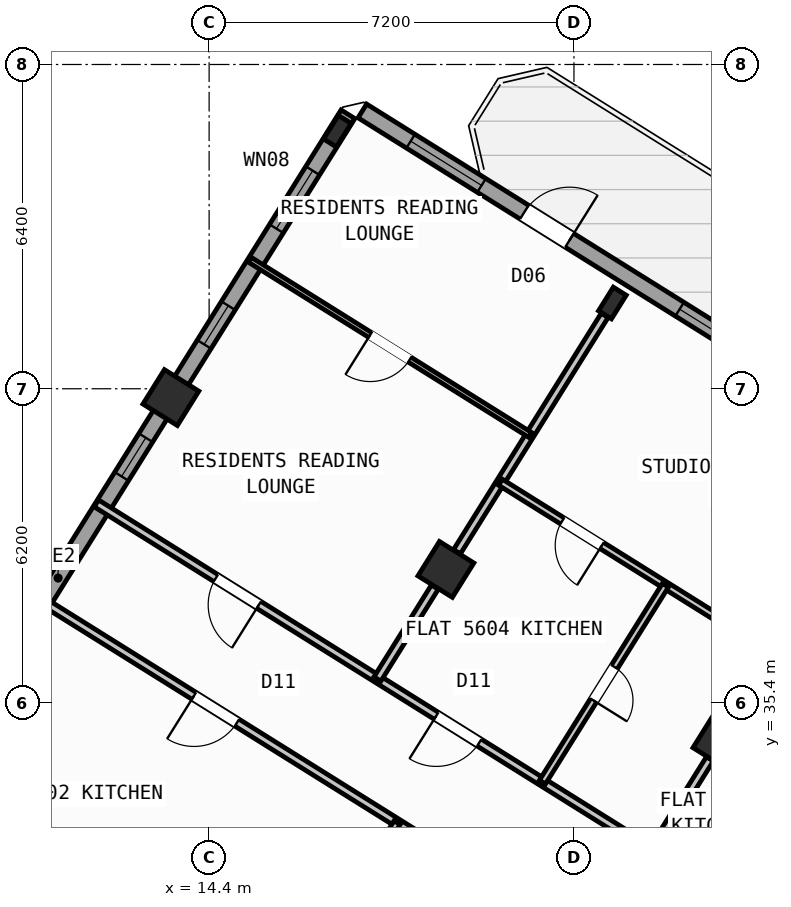
"""IFC4 building model, lengths in metres.
Left out: names, types, materials, properties, quantities, classifications, styles, units other than length and angle.
Written with IfcOpenShell. Run it as: python <this file> out.ifc"""

import sys

from ifc_helpers import new_model, si_unit, direction, frame, frame_2d, origin, origin_2d, place, context, subcontext, project, spatial, rectangle, hollow_rectangle, i_section, extrude, source, transform, mapped, element, fill, save


model = new_model("IFC4")
c1 = context("Model", 3, precision=1e-05, world=origin(), true_north=direction((0.0, 1.0)))
c2 = subcontext(c1, "Body", "Model", "MODEL_VIEW")
j1 = project(units=[si_unit("LENGTHUNIT", "METRE"), si_unit("PLANEANGLEUNIT", "RADIAN")], contexts=[c1])
p1 = place(None, origin())
s1 = spatial("IfcSite", under=j1, at=p1, CompositionType="ELEMENT")
p2 = place(p1, origin())
s2 = spatial("IfcBuilding", under=s1, at=p2, CompositionType="ELEMENT")
p3 = place(p2, frame((0.0, 0.0, 222.0)))
s3 = spatial("IfcBuildingStorey", under=s2, at=p3, CompositionType="ELEMENT", Elevation=222.0)
m1 = source(origin(), c2, "Body", "SweptSolid", [
    extrude(hollow_rectangle(XDim=0.8, YDim=0.8, WallThickness=0.032, at=origin_2d()), origin(), (0.0, 0.0, 1.0), 3.6),
])
p4 = place(p3, frame((24.5, 34.643, 0.0), z_axis=(0.0, 0.0, 1.0), x_axis=(-0.848048096156, 0.529919264233, 0.0)))
e1 = element("IfcColumn", 1, at=p4, inside=s3, PredefinedType="COLUMN", context=c2, shape_type="MappedRepresentation", body=[
    mapped(m1, transform((0.0, 0.0, 0.0), scale=1.0)),
])
m2 = source(origin(), c2, "Body", "SweptSolid", [
    extrude(i_section(OverallWidth=0.3, OverallDepth=0.55, WebThickness=0.015, FlangeThickness=0.029, at=origin_2d()), origin(), (0.0, 0.0, 1.0), 3.6),
])
p5 = place(p3, frame((22.358, 43.292, 0.0), z_axis=(0.0, 0.0, 1.0), x_axis=(-0.848048096156, 0.529919264233, 0.0)))
e2 = element("IfcColumn", 2, at=p5, inside=s3, PredefinedType="COLUMN", context=c2, shape_type="MappedRepresentation", body=[
    mapped(m2, transform((0.0, 0.0, 0.0), scale=1.0)),
])
p6 = place(p3, frame((19.073, 38.034, 0.0), z_axis=(0.0, 0.0, 1.0), x_axis=(-0.848048096156, 0.529919264233, 0.0)))
e3 = element("IfcColumn", 3, at=p6, inside=s3, PredefinedType="COLUMN", context=c2, shape_type="MappedRepresentation", body=[
    mapped(m1, transform((0.0, 0.0, 0.0), scale=1.0)),
])
p7 = place(p3, frame((16.931, 46.684, 0.0), z_axis=(0.0, 0.0, 1.0), x_axis=(-0.848048096156, 0.529919264233, 0.0)))
e4 = element("IfcColumn", 4, at=p7, inside=s3, PredefinedType="COLUMN", context=c2, shape_type="MappedRepresentation", body=[
    mapped(m2, transform((0.0, 0.0, 0.0), scale=1.0)),
])
p8 = place(p3, frame((13.646, 41.426, 0.0), z_axis=(0.0, 0.0, 1.0), x_axis=(-0.848048096156, 0.529919264233, 0.0)))
e5 = element("IfcColumn", 5, at=p8, inside=s3, PredefinedType="COLUMN", context=c2, shape_type="MappedRepresentation", body=[
    mapped(m1, transform((0.0, 0.0, 0.0), scale=1.0)),
])
p9 = place(p3, frame((5.7, 28.71, 0.0), z_axis=(0.0, 0.0, 1.0), x_axis=(0.529923711467, 0.8480453172, 0.0)))
e6 = element("IfcWall", 6, at=p9, inside=s3, PredefinedType="STANDARD", context=c2, shape_type="SweptSolid", body=[
    extrude(rectangle(XDim=21.587, YDim=0.32, at=frame_2d((10.794, 0.0))), origin(), (0.0, 0.0, 1.0), 2.825),
])
p10 = place(p9, frame((2.319, 0.0, 0.9)))
e7 = element("IfcOpeningElement", 7, at=p10, cuts=e6, PredefinedType="OPENING", context=c2, shape_type="SweptSolid", body=[
    extrude(rectangle(XDim=1.65, YDim=1.45, at=frame_2d((0.825, 0.725))), frame((0.0, 0.17, 0.0), z_axis=(0.0, -1.0, 0.0), x_axis=(1.0, 0.0, 0.0)), (0.0, 0.0, 1.0), 0.34),
])
p11 = place(p9, frame((8.629, 0.0, 1.0)))
e8 = element("IfcOpeningElement", 8, at=p11, cuts=e6, PredefinedType="OPENING", context=c2, shape_type="SweptSolid", body=[
    extrude(rectangle(XDim=0.9, YDim=1.25, at=frame_2d((0.45, 0.625))), frame((0.0, 0.17, 0.0), z_axis=(0.0, -1.0, 0.0), x_axis=(1.0, 0.0, 0.0)), (0.0, 0.0, 1.0), 0.34),
])
p12 = place(p9, frame((13.159, 0.0, 1.0)))
e9 = element("IfcOpeningElement", 9, at=p12, cuts=e6, PredefinedType="OPENING", context=c2, shape_type="SweptSolid", body=[
    extrude(rectangle(XDim=0.9, YDim=1.25, at=frame_2d((0.45, 0.625))), frame((0.0, 0.17, 0.0), z_axis=(0.0, -1.0, 0.0), x_axis=(1.0, 0.0, 0.0)), (0.0, 0.0, 1.0), 0.34),
])
p13 = place(p9, frame((16.232, 0.0, 1.0)))
e10 = element("IfcOpeningElement", 10, at=p13, cuts=e6, PredefinedType="OPENING", context=c2, shape_type="SweptSolid", body=[
    extrude(rectangle(XDim=0.9, YDim=1.25, at=frame_2d((0.45, 0.625))), frame((0.0, 0.17, 0.0), z_axis=(0.0, -1.0, 0.0), x_axis=(1.0, 0.0, 0.0)), (0.0, 0.0, 1.0), 0.34),
])
p14 = place(p9, frame((18.925, 0.0, 0.9)))
e11 = element("IfcOpeningElement", 11, at=p14, cuts=e6, PredefinedType="OPENING", context=c2, shape_type="SweptSolid", body=[
    extrude(rectangle(XDim=1.35, YDim=1.45, at=frame_2d((0.675, 0.725))), frame((0.0, 0.17, 0.0), z_axis=(0.0, -1.0, 0.0), x_axis=(1.0, 0.0, 0.0)), (0.0, 0.0, 1.0), 0.34),
])
p15 = place(p3, frame((17.424, 47.083, 0.0), z_axis=(0.0, 0.0, 1.0), x_axis=(0.848049927979, -0.529916332693, 0.0)))
e12 = element("IfcWall", 12, at=p15, inside=s3, PredefinedType="STANDARD", context=c2, shape_type="SweptSolid", body=[
    extrude(rectangle(XDim=29.223, YDim=0.32, at=frame_2d((14.612, 0.0))), origin(), (0.0, 0.0, 1.0), 3.35),
])
p16 = place(p15, frame((3.77, 0.0, 0.0)))
e13 = element("IfcOpeningElement", 13, at=p16, cuts=e12, PredefinedType="OPENING", context=c2, shape_type="SweptSolid", body=[
    extrude(rectangle(XDim=1.05, YDim=2.15, at=frame_2d((0.525, 1.075))), frame((0.0, 0.17, 0.0), z_axis=(0.0, -1.0, 0.0), x_axis=(1.0, 0.0, 0.0)), (0.0, 0.0, 1.0), 0.34),
])
p17 = place(p15, frame((1.125, 0.0, 0.9)))
e14 = element("IfcOpeningElement", 14, at=p17, cuts=e12, PredefinedType="OPENING", context=c2, shape_type="SweptSolid", body=[
    extrude(rectangle(XDim=1.65, YDim=1.45, at=frame_2d((0.825, 0.725))), frame((0.0, 0.17, 0.0), z_axis=(0.0, -1.0, 0.0), x_axis=(1.0, 0.0, 0.0)), (0.0, 0.0, 1.0), 0.34),
])
p18 = place(p15, frame((7.384, 0.0, 0.9)))
e15 = element("IfcOpeningElement", 15, at=p18, cuts=e12, PredefinedType="OPENING", context=c2, shape_type="SweptSolid", body=[
    extrude(rectangle(XDim=1.35, YDim=1.45, at=frame_2d((0.675, 0.725))), frame((0.0, 0.17, 0.0), z_axis=(0.0, -1.0, 0.0), x_axis=(1.0, 0.0, 0.0)), (0.0, 0.0, 1.0), 0.34),
])
p19 = place(p15, frame((10.054, 0.0, 0.9)))
e16 = element("IfcOpeningElement", 16, at=p19, cuts=e12, PredefinedType="OPENING", context=c2, shape_type="SweptSolid", body=[
    extrude(rectangle(XDim=1.35, YDim=1.45, at=frame_2d((0.675, 0.725))), frame((0.0, 0.17, 0.0), z_axis=(0.0, -1.0, 0.0), x_axis=(1.0, 0.0, 0.0)), (0.0, 0.0, 1.0), 0.34),
])
p20 = place(p15, frame((14.039, 0.0, 1.0)))
e17 = element("IfcOpeningElement", 17, at=p20, cuts=e12, PredefinedType="OPENING", context=c2, shape_type="SweptSolid", body=[
    extrude(rectangle(XDim=0.9, YDim=1.25, at=frame_2d((0.45, 0.625))), frame((0.0, 0.17, 0.0), z_axis=(0.0, -1.0, 0.0), x_axis=(1.0, 0.0, 0.0)), (0.0, 0.0, 1.0), 0.34),
])
p21 = place(p15, frame((17.254, 0.0, 1.0)))
e18 = element("IfcOpeningElement", 18, at=p21, cuts=e12, PredefinedType="OPENING", context=c2, shape_type="SweptSolid", body=[
    extrude(rectangle(XDim=0.9, YDim=1.25, at=frame_2d((0.45, 0.625))), frame((0.0, 0.17, 0.0), z_axis=(0.0, -1.0, 0.0), x_axis=(1.0, 0.0, 0.0)), (0.0, 0.0, 1.0), 0.34),
])
p22 = place(p15, frame((20.161, 0.0, 0.9)))
e19 = element("IfcOpeningElement", 19, at=p22, cuts=e12, PredefinedType="OPENING", context=c2, shape_type="SweptSolid", body=[
    extrude(rectangle(XDim=1.35, YDim=1.45, at=frame_2d((0.675, 0.725))), frame((0.0, 0.17, 0.0), z_axis=(0.0, -1.0, 0.0), x_axis=(1.0, 0.0, 0.0)), (0.0, 0.0, 1.0), 0.34),
])
p23 = place(p15, frame((22.846, 0.0, 0.9)))
e20 = element("IfcOpeningElement", 20, at=p23, cuts=e12, PredefinedType="OPENING", context=c2, shape_type="SweptSolid", body=[
    extrude(rectangle(XDim=1.35, YDim=1.45, at=frame_2d((0.675, 0.725))), frame((0.0, 0.17, 0.0), z_axis=(0.0, -1.0, 0.0), x_axis=(1.0, 0.0, 0.0)), (0.0, 0.0, 1.0), 0.34),
])
p24 = place(p15, frame((26.898, 0.0, 1.0)))
e21 = element("IfcOpeningElement", 21, at=p24, cuts=e12, PredefinedType="OPENING", context=c2, shape_type="SweptSolid", body=[
    extrude(rectangle(XDim=0.9, YDim=1.25, at=frame_2d((0.45, 0.625))), frame((0.0, 0.17, 0.0), z_axis=(0.0, -1.0, 0.0), x_axis=(1.0, 0.0, 0.0)), (0.0, 0.0, 1.0), 0.34),
])
p25 = place(p3, frame((26.363, 30.472, 0.0), z_axis=(0.0, 0.0, 1.0), x_axis=(-0.848052408131, 0.529912363569, 0.0)))
e22 = element("IfcWall", 22, at=p25, inside=s3, PredefinedType="PARTITIONING", context=c2, shape_type="SweptSolid", body=[
    extrude(rectangle(XDim=16.73, YDim=0.16, at=frame_2d((8.365, 0.0))), origin(), (0.0, 0.0, 1.0), 3.34),
])
p26 = place(p25, frame((2.22, 0.0, 0.0)))
e23 = element("IfcOpeningElement", 23, at=p26, cuts=e22, PredefinedType="OPENING", context=c2, shape_type="SweptSolid", body=[
    extrude(rectangle(XDim=0.86, YDim=2.05, at=frame_2d((0.43, 1.025))), frame((0.0, 0.09, 0.0), z_axis=(0.0, -1.0, 0.0), x_axis=(1.0, 0.0, 0.0)), (0.0, 0.0, 1.0), 0.18),
])
p27 = place(p25, frame((7.82, 0.0, 0.0)))
e24 = element("IfcOpeningElement", 24, at=p27, cuts=e22, PredefinedType="OPENING", context=c2, shape_type="SweptSolid", body=[
    extrude(rectangle(XDim=1.0, YDim=2.1, at=frame_2d((0.5, 1.05))), frame((0.0, 0.09, 0.0), z_axis=(0.0, -1.0, 0.0), x_axis=(1.0, 0.0, 0.0)), (0.0, 0.0, 1.0), 0.18),
])
p28 = place(p25, frame((12.95, 0.0, 0.0)))
e25 = element("IfcOpeningElement", 25, at=p28, cuts=e22, PredefinedType="OPENING", context=c2, shape_type="SweptSolid", body=[
    extrude(rectangle(XDim=1.0, YDim=2.1, at=frame_2d((0.5, 1.05))), frame((0.0, 0.09, 0.0), z_axis=(0.0, -1.0, 0.0), x_axis=(1.0, 0.0, 0.0)), (0.0, 0.0, 1.0), 0.18),
])
p29 = place(p3, frame((25.198, 28.606, 0.0), z_axis=(0.0, 0.0, 1.0), x_axis=(-0.848052408131, 0.529912363569, 0.0)))
e26 = element("IfcWall", 26, at=p29, inside=s3, PredefinedType="PARTITIONING", context=c2, shape_type="SweptSolid", body=[
    extrude(rectangle(XDim=16.73, YDim=0.16, at=frame_2d((8.365, 0.0))), origin(), (0.0, 0.0, 1.0), 3.34),
])
p30 = place(p29, frame((2.22, 0.0, 0.0)))
e27 = element("IfcOpeningElement", 27, at=p30, cuts=e26, PredefinedType="OPENING", context=c2, shape_type="SweptSolid", body=[
    extrude(rectangle(XDim=0.86, YDim=2.05, at=frame_2d((0.43, 1.025))), frame((0.0, 0.09, 0.0), z_axis=(0.0, -1.0, 0.0), x_axis=(1.0, 0.0, 0.0)), (0.0, 0.0, 1.0), 0.18),
])
p31 = place(p29, frame((12.084, 0.0, 0.0)))
e28 = element("IfcOpeningElement", 28, at=p31, cuts=e26, PredefinedType="OPENING", context=c2, shape_type="SweptSolid", body=[
    extrude(rectangle(XDim=1.0, YDim=2.1, at=frame_2d((0.5, 1.05))), frame((0.0, 0.09, 0.0), z_axis=(0.0, -1.0, 0.0), x_axis=(1.0, 0.0, 0.0)), (0.0, 0.0, 1.0), 0.18),
])
p32 = place(p3, frame((19.556, 26.73, 0.0), z_axis=(0.0, 0.0, 1.0), x_axis=(-0.848043949058, 0.52992590092, 0.0)))
e29 = element("IfcWall", 29, at=p32, inside=s3, PredefinedType="PLUMBINGWALL", context=c2, shape_type="SweptSolid", body=[
    extrude(rectangle(XDim=12.92, YDim=0.14, at=frame_2d((6.46, 0.0))), origin(), (0.0, 0.0, 1.0), 3.34),
])
p33 = place(p32, frame((5.849, 0.0, 0.0)))
e30 = element("IfcOpeningElement", 30, at=p33, cuts=e29, PredefinedType="OPENING", context=c2, shape_type="SweptSolid", body=[
    extrude(rectangle(XDim=0.92, YDim=2.08, at=frame_2d((0.46, 1.04))), frame((0.0, 0.08, 0.0), z_axis=(0.0, -1.0, 0.0), x_axis=(1.0, 0.0, 0.0)), (0.0, 0.0, 1.0), 0.16),
])
p34 = place(p3, frame((18.109, 33.035, 0.0), z_axis=(0.0, 0.0, 1.0), x_axis=(-0.529893526057, -0.848064178611, 0.0)))
e31 = element("IfcWall", 31, at=p34, inside=s3, PredefinedType="PLUMBINGWALL", context=c2, shape_type="SweptSolid", body=[
    extrude(rectangle(XDim=4.58, YDim=0.14, at=frame_2d((2.29, 0.0))), origin(), (0.0, 0.0, 1.0), 3.34),
])
p35 = place(p34, frame((1.9, 0.0, 0.0)))
e32 = element("IfcOpeningElement", 32, at=p35, cuts=e31, PredefinedType="OPENING", context=c2, shape_type="SweptSolid", body=[
    extrude(rectangle(XDim=0.78, YDim=2.05, at=frame_2d((0.39, 1.025))), frame((0.0, 0.08, 0.0), z_axis=(0.0, -1.0, 0.0), x_axis=(1.0, 0.0, 0.0)), (0.0, 0.0, 1.0), 0.16),
])
p36 = place(p3, frame((24.282, 34.293, 0.0), z_axis=(0.0, 0.0, 1.0), x_axis=(-0.529927092104, -0.84804320471, 0.0)))
e33 = element("IfcWall", 33, at=p36, inside=s3, PredefinedType="PARTITIONING", context=c2, shape_type="SweptSolid", body=[
    extrude(rectangle(XDim=2.138, YDim=0.16, at=frame_2d((1.069, 0.0))), origin(), (0.0, 0.0, 1.0), 2.825),
])
p37 = place(p3, frame((22.206, 43.049, 0.0), z_axis=(0.0, 0.0, 1.0), x_axis=(-0.529919150083, -0.848048167486, 0.0)))
e34 = element("IfcWall", 34, at=p37, inside=s3, PredefinedType="PARTITIONING", context=c2, shape_type="SweptSolid", body=[
    extrude(rectangle(XDim=5.501, YDim=0.16, at=frame_2d((2.75, 0.0))), origin(), (0.0, 0.0, 1.0), 2.825),
])
p38 = place(p3, frame((18.854, 37.685, 0.0), z_axis=(0.0, 0.0, 1.0), x_axis=(-0.52989628283, -0.848062456098, 0.0)))
e35 = element("IfcWall", 35, at=p38, inside=s3, PredefinedType="PARTITIONING", context=c2, shape_type="SweptSolid", body=[
    extrude(rectangle(XDim=2.138, YDim=0.16, at=frame_2d((1.069, 0.0))), origin(), (0.0, 0.0, 1.0), 2.825),
])
p39 = place(p3, frame((25.576, 36.365, 0.0), z_axis=(0.0, 0.0, 1.0), x_axis=(-0.848056163074, 0.529906354247, 0.0)))
e36 = element("IfcWall", 36, at=p39, inside=s3, PredefinedType="PLUMBINGWALL", context=c2, shape_type="SweptSolid", body=[
    extrude(rectangle(XDim=6.4, YDim=0.14, at=frame_2d((3.2, 0.0))), origin(), (0.0, 0.0, 1.0), 3.34),
])
p40 = place(p39, frame((4.04, 0.0, 0.0)))
e37 = element("IfcOpeningElement", 37, at=p40, cuts=e36, PredefinedType="OPENING", context=c2, shape_type="SweptSolid", body=[
    extrude(rectangle(XDim=0.92, YDim=2.08, at=frame_2d((0.46, 1.04))), frame((0.0, 0.08, 0.0), z_axis=(0.0, -1.0, 0.0), x_axis=(1.0, 0.0, 0.0)), (0.0, 0.0, 1.0), 0.16),
])
p41 = place(p3, frame((23.405, 37.721, 0.0), z_axis=(0.0, 0.0, 1.0), x_axis=(-0.529955816375, -0.848025254748, 0.0)))
e38 = element("IfcWall", 38, at=p41, inside=s3, PredefinedType="PLUMBINGWALL", context=c2, shape_type="SweptSolid", body=[
    extrude(rectangle(XDim=4.58, YDim=0.14, at=frame_2d((2.29, 0.0))), origin(), (0.0, 0.0, 1.0), 3.34),
])
p42 = place(p41, frame((1.9, 0.0, 0.0)))
e39 = element("IfcOpeningElement", 39, at=p42, cuts=e38, PredefinedType="OPENING", context=c2, shape_type="SweptSolid", body=[
    extrude(rectangle(XDim=0.78, YDim=2.05, at=frame_2d((0.39, 1.025))), frame((0.0, 0.08, 0.0), z_axis=(0.0, -1.0, 0.0), x_axis=(1.0, 0.0, 0.0)), (0.0, 0.0, 1.0), 0.16),
])
p43 = place(p3, frame((20.733, 40.69, 0.0), z_axis=(0.0, 0.0, 1.0), x_axis=(-0.848048787466, 0.529918157905, 0.0)))
e40 = element("IfcWall", 40, at=p43, inside=s3, PredefinedType="PARTITIONING", context=c2, shape_type="SweptSolid", body=[
    extrude(rectangle(XDim=6.52, YDim=0.11, at=frame_2d((3.26, 0.0))), origin(), (0.0, 0.0, 1.0), 3.34),
])
p44 = place(p43, frame((2.8, 0.0, 0.0)))
e41 = element("IfcOpeningElement", 41, at=p44, cuts=e40, PredefinedType="OPENING", context=c2, shape_type="SweptSolid", body=[
    extrude(rectangle(XDim=0.92, YDim=2.08, at=frame_2d((0.46, 1.04))), frame((0.0, 0.065, 0.0), z_axis=(0.0, -1.0, 0.0), x_axis=(1.0, 0.0, 0.0)), (0.0, 0.0, 1.0), 0.13),
])
m3 = source(origin(), c2, "Body", "SweptSolid", [
    extrude(rectangle(XDim=1.05, YDim=2.15, at=frame_2d((0.525, 1.075))), frame((0.0, 0.025, 0.0), z_axis=(0.0, -1.0, 0.0), x_axis=(1.0, 0.0, 0.0)), (0.0, 0.0, 1.0), 0.05),
])
p45 = place(p16, origin())
e42 = element("IfcDoor", 42, at=p45, inside=s3, OperationType="SINGLE_SWING_RIGHT", PredefinedType="DOOR", context=c2, shape_type="MappedRepresentation", body=[
    mapped(m3, transform((0.0, 0.0, 0.0), scale=1.0)),
])
fill(e13, e42)
m4 = source(origin(), c2, "Body", "SweptSolid", [
    extrude(rectangle(XDim=0.9, YDim=1.25, at=frame_2d((0.45, 0.625))), frame((0.0, 0.03, 0.0), z_axis=(0.0, -1.0, 0.0), x_axis=(1.0, 0.0, 0.0)), (0.0, 0.0, 1.0), 0.06),
])
p46 = place(p12, origin())
e43 = element("IfcWindow", 43, at=p46, inside=s3, PartitioningType="SINGLE_PANEL", PredefinedType="WINDOW", context=c2, shape_type="MappedRepresentation", body=[
    mapped(m4, transform((0.0, 0.0, 0.0), scale=1.0)),
])
fill(e9, e43)
p47 = place(p13, origin())
e44 = element("IfcWindow", 44, at=p47, inside=s3, PartitioningType="SINGLE_PANEL", PredefinedType="WINDOW", context=c2, shape_type="MappedRepresentation", body=[
    mapped(m4, transform((0.0, 0.0, 0.0), scale=1.0)),
])
fill(e10, e44)
m5 = source(origin(), c2, "Body", "SweptSolid", [
    extrude(rectangle(XDim=1.35, YDim=1.45, at=frame_2d((0.675, 0.725))), frame((0.0, 0.03, 0.0), z_axis=(0.0, -1.0, 0.0), x_axis=(1.0, 0.0, 0.0)), (0.0, 0.0, 1.0), 0.06),
])
p48 = place(p14, origin())
e45 = element("IfcWindow", 45, at=p48, inside=s3, PartitioningType="SINGLE_PANEL", PredefinedType="WINDOW", context=c2, shape_type="MappedRepresentation", body=[
    mapped(m5, transform((0.0, 0.0, 0.0), scale=1.0)),
])
fill(e11, e45)
m6 = source(origin(), c2, "Body", "SweptSolid", [
    extrude(rectangle(XDim=1.65, YDim=1.45, at=frame_2d((0.825, 0.725))), frame((0.0, 0.03, 0.0), z_axis=(0.0, -1.0, 0.0), x_axis=(1.0, 0.0, 0.0)), (0.0, 0.0, 1.0), 0.06),
])
p49 = place(p17, origin())
e46 = element("IfcWindow", 46, at=p49, inside=s3, PartitioningType="SINGLE_PANEL", PredefinedType="WINDOW", context=c2, shape_type="MappedRepresentation", body=[
    mapped(m6, transform((0.0, 0.0, 0.0), scale=1.0)),
])
fill(e14, e46)
p50 = place(p18, origin())
e47 = element("IfcWindow", 47, at=p50, inside=s3, PartitioningType="SINGLE_PANEL", PredefinedType="WINDOW", context=c2, shape_type="MappedRepresentation", body=[
    mapped(m5, transform((0.0, 0.0, 0.0), scale=1.0)),
])
fill(e15, e47)
m7 = source(origin(), c2, "Body", "SweptSolid", [
    extrude(rectangle(XDim=1.0, YDim=2.1, at=frame_2d((0.5, 1.05))), frame((0.0, 0.025, 0.0), z_axis=(0.0, -1.0, 0.0), x_axis=(1.0, 0.0, 0.0)), (0.0, 0.0, 1.0), 0.05),
])
p51 = place(p31, origin())
e48 = element("IfcDoor", 48, at=p51, inside=s3, OperationType="SINGLE_SWING_RIGHT", PredefinedType="DOOR", context=c2, shape_type="MappedRepresentation", body=[
    mapped(m7, transform((0.0, 0.0, 0.0), scale=1.0)),
])
fill(e28, e48)
p52 = place(p27, origin())
e49 = element("IfcDoor", 49, at=p52, inside=s3, OperationType="SINGLE_SWING_RIGHT", PredefinedType="DOOR", context=c2, shape_type="MappedRepresentation", body=[
    mapped(m7, transform((0.0, 0.0, 0.0), scale=1.0)),
])
fill(e24, e49)
m8 = source(origin(), c2, "Body", "SweptSolid", [
    extrude(rectangle(XDim=0.92, YDim=2.08, at=frame_2d((0.46, 1.04))), frame((0.0, 0.025, 0.0), z_axis=(0.0, -1.0, 0.0), x_axis=(1.0, 0.0, 0.0)), (0.0, 0.0, 1.0), 0.05),
])
p53 = place(p40, origin())
e50 = element("IfcDoor", 50, at=p53, inside=s3, OperationType="SINGLE_SWING_LEFT", PredefinedType="DOOR", context=c2, shape_type="MappedRepresentation", body=[
    mapped(m8, transform((0.0, 0.0, 0.0), scale=1.0)),
])
fill(e37, e50)
m9 = source(origin(), c2, "Body", "SweptSolid", [
    extrude(rectangle(XDim=0.78, YDim=2.05, at=frame_2d((0.39, 1.025))), frame((0.0, 0.025, 0.0), z_axis=(0.0, -1.0, 0.0), x_axis=(1.0, 0.0, 0.0)), (0.0, 0.0, 1.0), 0.05),
])
p54 = place(p42, origin())
e51 = element("IfcDoor", 51, at=p54, inside=s3, OperationType="SINGLE_SWING_RIGHT", PredefinedType="DOOR", context=c2, shape_type="MappedRepresentation", body=[
    mapped(m9, transform((0.0, 0.0, 0.0), scale=1.0)),
])
fill(e39, e51)
p55 = place(p28, origin())
e52 = element("IfcDoor", 52, at=p55, inside=s3, OperationType="SINGLE_SWING_LEFT", PredefinedType="DOOR", context=c2, shape_type="MappedRepresentation", body=[
    mapped(m7, transform((0.0, 0.0, 0.0), scale=1.0)),
])
fill(e25, e52)
p56 = place(p44, origin())
e53 = element("IfcDoor", 53, at=p56, inside=s3, OperationType="SINGLE_SWING_RIGHT", PredefinedType="DOOR", context=c2, shape_type="MappedRepresentation", body=[
    mapped(m8, transform((0.0, 0.0, 0.0), scale=1.0)),
])
fill(e41, e53)
save(model, sys.argv[1])
